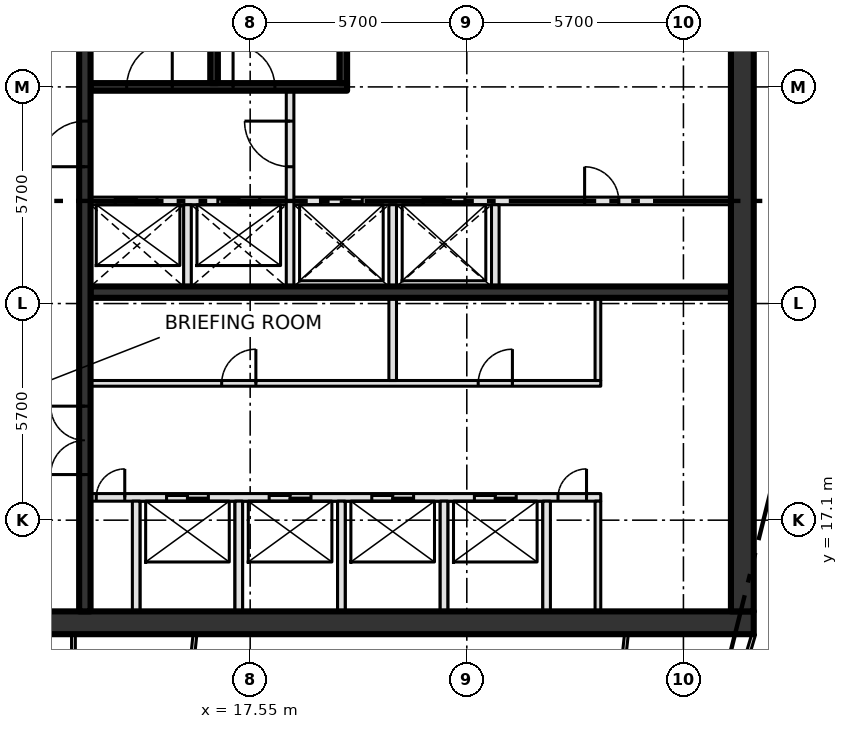
"""IFC4 building model, lengths in metres.
Left out: names, types, materials, properties, quantities, classifications, styles, units other than length and angle.
Written with IfcOpenShell. Run it as: python <this file> out.ifc"""

import sys

from ifc_helpers import new_model, si_unit, direction, frame, frame_2d, origin, place, context, subcontext, project, spatial, rectangle, extrude, element, fill, save


model = new_model("IFC4")
c1 = context("Model", 3, precision=1e-05, world=origin(), true_north=direction((0.0, 1.0)))
c2 = subcontext(c1, "Body", "Model", "MODEL_VIEW")
j1 = project(units=[si_unit("LENGTHUNIT", "METRE"), si_unit("PLANEANGLEUNIT", "RADIAN")], contexts=[c1])
p1 = place(None, origin())
s1 = spatial("IfcSite", under=j1, at=p1, CompositionType="ELEMENT")
p2 = place(p1, origin())
s2 = spatial("IfcBuilding", under=s1, at=p2, CompositionType="ELEMENT")
p3 = place(p2, frame((0.0, 0.0, 323.4)))
s3 = spatial("IfcBuildingStorey", under=s2, at=p3, CompositionType="ELEMENT", Elevation=323.4)
p4 = place(p3, frame((8.0, 14.4, -0.3), z_axis=(0.0, 0.0, 1.0), x_axis=(1.0, 0.0, 0.0)))
e1 = element("IfcWall", 1, at=p4, inside=s3, PredefinedType="SHEAR", context=c2, shape_type="SweptSolid", body=[
    extrude(rectangle(XDim=22.8, YDim=0.6, at=frame_2d((11.4, 0.0))), origin(), (0.0, 0.0, 1.0), 4.2),
])
p5 = place(p4, frame((2.3, 0.0, 0.3)))
e2 = element("IfcOpeningElement", 2, at=p5, cuts=e1, PredefinedType="OPENING", context=c2, shape_type="SweptSolid", body=[
    extrude(rectangle(XDim=1.8, YDim=2.1, at=frame_2d((0.9, 1.05))), frame((0.0, 0.31, 0.0), z_axis=(0.0, -1.0, 0.0), x_axis=(1.0, 0.0, 0.0)), (0.0, 0.0, 1.0), 0.62),
])
p6 = place(p3, frame((30.5, 14.7, -0.3), z_axis=(0.0, 0.0, 1.0), x_axis=(0.0, 1.0, 0.0)))
e3 = element("IfcWall", 3, at=p6, inside=s3, PredefinedType="SHEAR", context=c2, shape_type="SweptSolid", body=[
    extrude(rectangle(XDim=21.0, YDim=0.6, at=frame_2d((10.5, 0.0))), origin(), (0.0, 0.0, 1.0), 4.2),
])
p7 = place(p3, frame((13.35, 17.7, 0.0), z_axis=(0.0, 0.0, 1.0), x_axis=(1.0, 0.0, 0.0)))
e4 = element("IfcWall", 4, at=p7, inside=s3, PredefinedType="SOLIDWALL", context=c2, shape_type="SweptSolid", body=[
    extrude(rectangle(XDim=13.425, YDim=0.2, at=frame_2d((6.712, 0.0))), origin(), (0.0, 0.0, 1.0), 3.9),
])
p8 = place(p7, frame((2.0, 0.0, 0.0)))
e5 = element("IfcOpeningElement", 5, at=p8, cuts=e4, PredefinedType="OPENING", context=c2, shape_type="SweptSolid", body=[
    extrude(rectangle(XDim=1.1, YDim=2.1, at=frame_2d((0.55, 1.05))), frame((0.0, 0.11, 0.0), z_axis=(0.0, -1.0, 0.0), x_axis=(1.0, 0.0, 0.0)), (0.0, 0.0, 1.0), 0.22),
])
p9 = place(p7, frame((4.7, 0.0, 0.0)))
e6 = element("IfcOpeningElement", 6, at=p9, cuts=e4, PredefinedType="OPENING", context=c2, shape_type="SweptSolid", body=[
    extrude(rectangle(XDim=1.1, YDim=2.1, at=frame_2d((0.55, 1.05))), frame((0.0, 0.11, 0.0), z_axis=(0.0, -1.0, 0.0), x_axis=(1.0, 0.0, 0.0)), (0.0, 0.0, 1.0), 0.22),
])
p10 = place(p7, frame((7.4, 0.0, 0.0)))
e7 = element("IfcOpeningElement", 7, at=p10, cuts=e4, PredefinedType="OPENING", context=c2, shape_type="SweptSolid", body=[
    extrude(rectangle(XDim=1.1, YDim=2.1, at=frame_2d((0.55, 1.05))), frame((0.0, 0.11, 0.0), z_axis=(0.0, -1.0, 0.0), x_axis=(1.0, 0.0, 0.0)), (0.0, 0.0, 1.0), 0.22),
])
p11 = place(p7, frame((10.1, 0.0, 0.0)))
e8 = element("IfcOpeningElement", 8, at=p11, cuts=e4, PredefinedType="OPENING", context=c2, shape_type="SweptSolid", body=[
    extrude(rectangle(XDim=1.1, YDim=2.1, at=frame_2d((0.55, 1.05))), frame((0.0, 0.11, 0.0), z_axis=(0.0, -1.0, 0.0), x_axis=(1.0, 0.0, 0.0)), (0.0, 0.0, 1.0), 0.22),
])
p12 = place(p7, frame((0.15, 0.0, 0.0)))
e9 = element("IfcOpeningElement", 9, at=p12, cuts=e4, PredefinedType="OPENING", context=c2, shape_type="SweptSolid", body=[
    extrude(rectangle(XDim=0.75, YDim=2.1, at=frame_2d((0.375, 1.05))), frame((0.0, 0.11, 0.0), z_axis=(0.0, -1.0, 0.0), x_axis=(1.0, 0.0, 0.0)), (0.0, 0.0, 1.0), 0.22),
])
p13 = place(p7, frame((12.3, 0.0, 0.0)))
e10 = element("IfcOpeningElement", 10, at=p13, cuts=e4, PredefinedType="OPENING", context=c2, shape_type="SweptSolid", body=[
    extrude(rectangle(XDim=0.75, YDim=2.1, at=frame_2d((0.375, 1.05))), frame((0.0, 0.11, 0.0), z_axis=(0.0, -1.0, 0.0), x_axis=(1.0, 0.0, 0.0)), (0.0, 0.0, 1.0), 0.22),
])
p14 = place(p3, frame((13.35, 20.7, 0.0), z_axis=(0.0, 0.0, 1.0), x_axis=(1.0, 0.0, 0.0)))
e11 = element("IfcWall", 11, at=p14, inside=s3, PredefinedType="PARTITIONING", context=c2, shape_type="SweptSolid", body=[
    extrude(rectangle(XDim=13.425, YDim=0.15, at=frame_2d((6.712, 0.0))), origin(), (0.0, 0.0, 1.0), 3.9),
])
p15 = place(p14, frame((3.45, 0.0, 0.0)))
e12 = element("IfcOpeningElement", 12, at=p15, cuts=e11, PredefinedType="OPENING", context=c2, shape_type="SweptSolid", body=[
    extrude(rectangle(XDim=0.9, YDim=2.1, at=frame_2d((0.45, 1.05))), frame((0.0, 0.085, 0.0), z_axis=(0.0, -1.0, 0.0), x_axis=(1.0, 0.0, 0.0)), (0.0, 0.0, 1.0), 0.17),
])
p16 = place(p14, frame((10.2, 0.0, 0.0)))
e13 = element("IfcOpeningElement", 13, at=p16, cuts=e11, PredefinedType="OPENING", context=c2, shape_type="SweptSolid", body=[
    extrude(rectangle(XDim=0.9, YDim=2.1, at=frame_2d((0.45, 1.05))), frame((0.0, 0.085, 0.0), z_axis=(0.0, -1.0, 0.0), x_axis=(1.0, 0.0, 0.0)), (0.0, 0.0, 1.0), 0.17),
])
p17 = place(p3, frame((13.35, 23.1, 0.0), z_axis=(0.0, 0.0, 1.0), x_axis=(1.0, 0.0, 0.0)))
e14 = element("IfcWall", 14, at=p17, inside=s3, PredefinedType="SHEAR", context=c2, shape_type="SweptSolid", body=[
    extrude(rectangle(XDim=16.85, YDim=0.3, at=frame_2d((8.425, 0.0))), origin(), (0.0, 0.0, 1.0), 3.9),
])
p18 = place(p3, frame((13.35, 25.5, 0.0), z_axis=(0.0, 0.0, 1.0), x_axis=(1.0, 0.0, 0.0)))
e15 = element("IfcWall", 15, at=p18, inside=s3, PredefinedType="SOLIDWALL", context=c2, shape_type="SweptSolid", body=[
    extrude(rectangle(XDim=16.85, YDim=0.2, at=frame_2d((8.425, 0.0))), origin(), (0.0, 0.0, 1.0), 3.9),
])
p19 = place(p18, frame((0.65, 0.0, 0.0)))
e16 = element("IfcOpeningElement", 16, at=p19, cuts=e15, PredefinedType="OPENING", context=c2, shape_type="SweptSolid", body=[
    extrude(rectangle(XDim=1.1, YDim=2.1, at=frame_2d((0.55, 1.05))), frame((0.0, 0.11, 0.0), z_axis=(0.0, -1.0, 0.0), x_axis=(1.0, 0.0, 0.0)), (0.0, 0.0, 1.0), 0.22),
])
p20 = place(p18, frame((3.35, 0.0, 0.0)))
e17 = element("IfcOpeningElement", 17, at=p20, cuts=e15, PredefinedType="OPENING", context=c2, shape_type="SweptSolid", body=[
    extrude(rectangle(XDim=1.1, YDim=2.1, at=frame_2d((0.55, 1.05))), frame((0.0, 0.11, 0.0), z_axis=(0.0, -1.0, 0.0), x_axis=(1.0, 0.0, 0.0)), (0.0, 0.0, 1.0), 0.22),
])
p21 = place(p18, frame((6.05, 0.0, 0.0)))
e18 = element("IfcOpeningElement", 18, at=p21, cuts=e15, PredefinedType="OPENING", context=c2, shape_type="SweptSolid", body=[
    extrude(rectangle(XDim=1.1, YDim=2.1, at=frame_2d((0.55, 1.05))), frame((0.0, 0.11, 0.0), z_axis=(0.0, -1.0, 0.0), x_axis=(1.0, 0.0, 0.0)), (0.0, 0.0, 1.0), 0.22),
])
p22 = place(p18, frame((8.75, 0.0, 0.0)))
e19 = element("IfcOpeningElement", 19, at=p22, cuts=e15, PredefinedType="OPENING", context=c2, shape_type="SweptSolid", body=[
    extrude(rectangle(XDim=1.1, YDim=2.1, at=frame_2d((0.55, 1.05))), frame((0.0, 0.11, 0.0), z_axis=(0.0, -1.0, 0.0), x_axis=(1.0, 0.0, 0.0)), (0.0, 0.0, 1.0), 0.22),
])
p23 = place(p18, frame((13.0, 0.0, 0.0)))
e20 = element("IfcOpeningElement", 20, at=p23, cuts=e15, PredefinedType="OPENING", context=c2, shape_type="SweptSolid", body=[
    extrude(rectangle(XDim=0.9, YDim=2.1, at=frame_2d((0.45, 1.05))), frame((0.0, 0.11, 0.0), z_axis=(0.0, -1.0, 0.0), x_axis=(1.0, 0.0, 0.0)), (0.0, 0.0, 1.0), 0.22),
])
p24 = place(p3, frame((13.35, 28.5, 0.0), z_axis=(0.0, 0.0, 1.0), x_axis=(1.0, 0.0, 0.0)))
e21 = element("IfcWall", 21, at=p24, inside=s3, PredefinedType="SOLIDWALL", context=c2, shape_type="SweptSolid", body=[
    extrude(rectangle(XDim=6.75, YDim=0.2, at=frame_2d((3.375, 0.0))), origin(), (0.0, 0.0, 1.0), 3.9),
])
p25 = place(p24, frame((0.95, 0.0, 0.0)))
e22 = element("IfcOpeningElement", 22, at=p25, cuts=e21, PredefinedType="OPENING", context=c2, shape_type="SweptSolid", body=[
    extrude(rectangle(XDim=1.2, YDim=2.1, at=frame_2d((0.6, 1.05))), frame((0.0, 0.11, 0.0), z_axis=(0.0, -1.0, 0.0), x_axis=(1.0, 0.0, 0.0)), (0.0, 0.0, 1.0), 0.22),
])
p26 = place(p24, frame((3.75, 0.0, 0.0)))
e23 = element("IfcOpeningElement", 23, at=p26, cuts=e21, PredefinedType="OPENING", context=c2, shape_type="SweptSolid", body=[
    extrude(rectangle(XDim=1.1, YDim=2.1, at=frame_2d((0.55, 1.05))), frame((0.0, 0.11, 0.0), z_axis=(0.0, -1.0, 0.0), x_axis=(1.0, 0.0, 0.0)), (0.0, 0.0, 1.0), 0.22),
])
p27 = place(p3, frame((13.2, 14.7, 0.0), z_axis=(0.0, 0.0, 1.0), x_axis=(0.0, 1.0, 0.0)))
e24 = element("IfcWall", 24, at=p27, inside=s3, PredefinedType="SHEAR", context=c2, shape_type="SweptSolid", body=[
    extrude(rectangle(XDim=21.0, YDim=0.3, at=frame_2d((10.5, 0.0))), origin(), (0.0, 0.0, 1.0), 3.9),
])
p28 = place(p27, frame((3.6, 0.0, 0.0)))
e25 = element("IfcOpeningElement", 25, at=p28, cuts=e24, PredefinedType="OPENING", context=c2, shape_type="SweptSolid", body=[
    extrude(rectangle(XDim=1.8, YDim=2.1, at=frame_2d((0.9, 1.05))), frame((0.0, 0.16, 0.0), z_axis=(0.0, -1.0, 0.0), x_axis=(1.0, 0.0, 0.0)), (0.0, 0.0, 1.0), 0.32),
])
p29 = place(p27, frame((11.7, 0.0, 0.0)))
e26 = element("IfcOpeningElement", 26, at=p29, cuts=e24, PredefinedType="OPENING", context=c2, shape_type="SweptSolid", body=[
    extrude(rectangle(XDim=1.2, YDim=2.1, at=frame_2d((0.6, 1.05))), frame((0.0, 0.16, 0.0), z_axis=(0.0, -1.0, 0.0), x_axis=(1.0, 0.0, 0.0)), (0.0, 0.0, 1.0), 0.32),
])
p30 = place(p3, frame((14.55, 14.7, 0.0), z_axis=(0.0, 0.0, 1.0), x_axis=(0.0, 1.0, 0.0)))
e27 = element("IfcWall", 27, at=p30, inside=s3, PredefinedType="SOLIDWALL", context=c2, shape_type="SweptSolid", body=[
    extrude(rectangle(XDim=2.9, YDim=0.2, at=frame_2d((1.45, 0.0))), origin(), (0.0, 0.0, 1.0), 3.9),
])
p31 = place(p3, frame((15.9, 23.25, 0.0), z_axis=(0.0, 0.0, 1.0), x_axis=(0.0, 1.0, 0.0)))
e28 = element("IfcWall", 28, at=p31, inside=s3, PredefinedType="SOLIDWALL", context=c2, shape_type="SweptSolid", body=[
    extrude(rectangle(XDim=2.15, YDim=0.2, at=frame_2d((1.075, 0.0))), origin(), (0.0, 0.0, 1.0), 3.9),
])
p32 = place(p3, frame((16.6, 28.6, 0.0), z_axis=(0.0, 0.0, 1.0), x_axis=(0.0, 1.0, 0.0)))
e29 = element("IfcWall", 29, at=p32, inside=s3, PredefinedType="SOLIDWALL", context=c2, shape_type="SweptSolid", body=[
    extrude(rectangle(XDim=7.1, YDim=0.2, at=frame_2d((3.55, 0.0))), origin(), (0.0, 0.0, 1.0), 3.9),
])
p33 = place(p3, frame((17.25, 14.7, 0.0), z_axis=(0.0, 0.0, 1.0), x_axis=(0.0, 1.0, 0.0)))
e30 = element("IfcWall", 30, at=p33, inside=s3, PredefinedType="SOLIDWALL", context=c2, shape_type="SweptSolid", body=[
    extrude(rectangle(XDim=2.9, YDim=0.2, at=frame_2d((1.45, 0.0))), origin(), (0.0, 0.0, 1.0), 3.9),
])
p34 = place(p3, frame((18.6, 23.25, 0.0), z_axis=(0.0, 0.0, 1.0), x_axis=(0.0, 1.0, 0.0)))
e31 = element("IfcWall", 31, at=p34, inside=s3, PredefinedType="SOLIDWALL", context=c2, shape_type="SweptSolid", body=[
    extrude(rectangle(XDim=5.15, YDim=0.2, at=frame_2d((2.575, 0.0))), origin(), (0.0, 0.0, 1.0), 3.9),
])
p35 = place(p34, frame((3.15, 0.0, 0.0)))
e32 = element("IfcOpeningElement", 32, at=p35, cuts=e31, PredefinedType="OPENING", context=c2, shape_type="SweptSolid", body=[
    extrude(rectangle(XDim=1.2, YDim=2.1, at=frame_2d((0.6, 1.05))), frame((0.0, 0.11, 0.0), z_axis=(0.0, -1.0, 0.0), x_axis=(1.0, 0.0, 0.0)), (0.0, 0.0, 1.0), 0.22),
])
p36 = place(p3, frame((19.95, 14.7, 0.0), z_axis=(0.0, 0.0, 1.0), x_axis=(0.0, 1.0, 0.0)))
e33 = element("IfcWall", 33, at=p36, inside=s3, PredefinedType="SOLIDWALL", context=c2, shape_type="SweptSolid", body=[
    extrude(rectangle(XDim=2.9, YDim=0.2, at=frame_2d((1.45, 0.0))), origin(), (0.0, 0.0, 1.0), 3.9),
])
p37 = place(p3, frame((20.0, 28.6, 0.0), z_axis=(0.0, 0.0, 1.0), x_axis=(0.0, 1.0, 0.0)))
e34 = element("IfcWall", 34, at=p37, inside=s3, PredefinedType="SOLIDWALL", context=c2, shape_type="SweptSolid", body=[
    extrude(rectangle(XDim=7.1, YDim=0.2, at=frame_2d((3.55, 0.0))), origin(), (0.0, 0.0, 1.0), 3.9),
])
p38 = place(p3, frame((21.3, 20.775, 0.0), z_axis=(0.0, 0.0, 1.0), x_axis=(0.0, 1.0, 0.0)))
e35 = element("IfcWall", 35, at=p38, inside=s3, PredefinedType="SOLIDWALL", context=c2, shape_type="SweptSolid", body=[
    extrude(rectangle(XDim=4.625, YDim=0.2, at=frame_2d((2.312, 0.0))), origin(), (0.0, 0.0, 1.0), 3.9),
])
p39 = place(p3, frame((22.65, 14.7, 0.0), z_axis=(0.0, 0.0, 1.0), x_axis=(0.0, 1.0, 0.0)))
e36 = element("IfcWall", 36, at=p39, inside=s3, PredefinedType="SOLIDWALL", context=c2, shape_type="SweptSolid", body=[
    extrude(rectangle(XDim=2.9, YDim=0.2, at=frame_2d((1.45, 0.0))), origin(), (0.0, 0.0, 1.0), 3.9),
])
p40 = place(p3, frame((24.0, 23.25, 0.0), z_axis=(0.0, 0.0, 1.0), x_axis=(0.0, 1.0, 0.0)))
e37 = element("IfcWall", 37, at=p40, inside=s3, PredefinedType="SOLIDWALL", context=c2, shape_type="SweptSolid", body=[
    extrude(rectangle(XDim=2.15, YDim=0.2, at=frame_2d((1.075, 0.0))), origin(), (0.0, 0.0, 1.0), 3.9),
])
p41 = place(p3, frame((25.35, 14.7, 0.0), z_axis=(0.0, 0.0, 1.0), x_axis=(0.0, 1.0, 0.0)))
e38 = element("IfcWall", 38, at=p41, inside=s3, PredefinedType="SOLIDWALL", context=c2, shape_type="SweptSolid", body=[
    extrude(rectangle(XDim=2.9, YDim=0.2, at=frame_2d((1.45, 0.0))), origin(), (0.0, 0.0, 1.0), 3.9),
])
p42 = place(p3, frame((26.7, 14.7, 0.0), z_axis=(0.0, 0.0, 1.0), x_axis=(0.0, 1.0, 0.0)))
e39 = element("IfcWall", 39, at=p42, inside=s3, PredefinedType="PARTITIONING", context=c2, shape_type="SweptSolid", body=[
    extrude(rectangle(XDim=2.9, YDim=0.15, at=frame_2d((1.45, 0.0))), origin(), (0.0, 0.0, 1.0), 3.9),
])
p43 = place(p3, frame((26.7, 20.775, 0.0), z_axis=(0.0, 0.0, 1.0), x_axis=(0.0, 1.0, 0.0)))
e40 = element("IfcWall", 40, at=p43, inside=s3, PredefinedType="PARTITIONING", context=c2, shape_type="SweptSolid", body=[
    extrude(rectangle(XDim=2.175, YDim=0.15, at=frame_2d((1.087, 0.0))), origin(), (0.0, 0.0, 1.0), 3.9),
])
p44 = place(p3, frame((12.9, 10.078, 0.0), z_axis=(0.0, 0.0, 1.0), x_axis=(0.0, 1.0, 0.0)))
e41 = element("IfcWall", 41, at=p44, inside=s3, PredefinedType="PARTITIONING", context=c2, shape_type="SweptSolid", body=[
    extrude(rectangle(XDim=4.022, YDim=0.1, at=frame_2d((2.011, 0.0))), origin(), (0.0, 0.0, 1.0), 3.9),
])
p45 = place(p3, frame((30.8, 14.1, 0.0), z_axis=(0.0, 0.0, 1.0), x_axis=(-0.28588265334, -0.958264633867, 0.0)))
e42 = element("IfcWall", 42, at=p45, inside=s3, PredefinedType="PARTITIONING", context=c2, shape_type="SweptSolid", body=[
    extrude(rectangle(XDim=8.776, YDim=0.1, at=frame_2d((4.388, 0.0))), origin(), (0.0, 0.0, 1.0), 3.9),
])
p46 = place(p45, frame((3.68, 0.0, 0.0)))
e43 = element("IfcOpeningElement", 43, at=p46, cuts=e42, PredefinedType="OPENING", context=c2, shape_type="SweptSolid", body=[
    extrude(rectangle(XDim=1.0, YDim=2.1, at=frame_2d((0.5, 1.05))), frame((0.0, 0.06, 0.0), z_axis=(0.0, -1.0, 0.0), x_axis=(1.0, 0.0, 0.0)), (0.0, 0.0, 1.0), 0.12),
])
p47 = place(p3, frame((15.554, 8.924, 0.0), z_axis=(0.0, 0.0, 1.0), x_axis=(0.104513853303, 0.994523430829, 0.0)))
e44 = element("IfcWall", 44, at=p47, inside=s3, PredefinedType="PARTITIONING", context=c2, shape_type="SweptSolid", body=[
    extrude(rectangle(XDim=5.205, YDim=0.1, at=frame_2d((2.602, 0.0))), origin(), (0.0, 0.0, 1.0), 3.9),
])
p48 = place(p3, frame((26.615, 6.166, 0.0), z_axis=(0.0, 0.0, 1.0), x_axis=(0.10453822663, 0.994520869149, 0.0)))
e45 = element("IfcWall", 45, at=p48, inside=s3, PredefinedType="PARTITIONING", context=c2, shape_type="SweptSolid", body=[
    extrude(rectangle(XDim=7.978, YDim=0.1, at=frame_2d((3.989, 0.0))), origin(), (0.0, 0.0, 1.0), 3.9),
])
p49 = place(p8, origin())
e46 = element("IfcDoor", 46, at=p49, inside=s3, OperationType="SLIDING_TO_LEFT", PredefinedType="DOOR", context=c2, shape_type="SweptSolid", body=[
    extrude(rectangle(XDim=1.1, YDim=2.1, at=frame_2d((0.55, 1.05))), frame((0.0, 0.025, 0.0), z_axis=(0.0, -1.0, 0.0), x_axis=(1.0, 0.0, 0.0)), (0.0, 0.0, 1.0), 0.05),
])
fill(e5, e46)
p50 = place(p9, origin())
e47 = element("IfcDoor", 47, at=p50, inside=s3, OperationType="SLIDING_TO_LEFT", PredefinedType="DOOR", context=c2, shape_type="SweptSolid", body=[
    extrude(rectangle(XDim=1.1, YDim=2.1, at=frame_2d((0.55, 1.05))), frame((0.0, 0.025, 0.0), z_axis=(0.0, -1.0, 0.0), x_axis=(1.0, 0.0, 0.0)), (0.0, 0.0, 1.0), 0.05),
])
fill(e6, e47)
p51 = place(p10, origin())
e48 = element("IfcDoor", 48, at=p51, inside=s3, OperationType="SLIDING_TO_LEFT", PredefinedType="DOOR", context=c2, shape_type="SweptSolid", body=[
    extrude(rectangle(XDim=1.1, YDim=2.1, at=frame_2d((0.55, 1.05))), frame((0.0, 0.025, 0.0), z_axis=(0.0, -1.0, 0.0), x_axis=(1.0, 0.0, 0.0)), (0.0, 0.0, 1.0), 0.05),
])
fill(e7, e48)
p52 = place(p11, origin())
e49 = element("IfcDoor", 49, at=p52, inside=s3, OperationType="SLIDING_TO_LEFT", PredefinedType="DOOR", context=c2, shape_type="SweptSolid", body=[
    extrude(rectangle(XDim=1.1, YDim=2.1, at=frame_2d((0.55, 1.05))), frame((0.0, 0.025, 0.0), z_axis=(0.0, -1.0, 0.0), x_axis=(1.0, 0.0, 0.0)), (0.0, 0.0, 1.0), 0.05),
])
fill(e8, e49)
p53 = place(p19, origin())
e50 = element("IfcDoor", 50, at=p53, inside=s3, OperationType="SLIDING_TO_LEFT", PredefinedType="DOOR", context=c2, shape_type="SweptSolid", body=[
    extrude(rectangle(XDim=1.1, YDim=2.1, at=frame_2d((0.55, 1.05))), frame((0.0, 0.025, 0.0), z_axis=(0.0, -1.0, 0.0), x_axis=(1.0, 0.0, 0.0)), (0.0, 0.0, 1.0), 0.05),
])
fill(e16, e50)
p54 = place(p20, origin())
e51 = element("IfcDoor", 51, at=p54, inside=s3, OperationType="SLIDING_TO_LEFT", PredefinedType="DOOR", context=c2, shape_type="SweptSolid", body=[
    extrude(rectangle(XDim=1.1, YDim=2.1, at=frame_2d((0.55, 1.05))), frame((0.0, 0.025, 0.0), z_axis=(0.0, -1.0, 0.0), x_axis=(1.0, 0.0, 0.0)), (0.0, 0.0, 1.0), 0.05),
])
fill(e17, e51)
p55 = place(p21, origin())
e52 = element("IfcDoor", 52, at=p55, inside=s3, OperationType="SLIDING_TO_LEFT", PredefinedType="DOOR", context=c2, shape_type="SweptSolid", body=[
    extrude(rectangle(XDim=1.1, YDim=2.1, at=frame_2d((0.55, 1.05))), frame((0.0, 0.025, 0.0), z_axis=(0.0, -1.0, 0.0), x_axis=(1.0, 0.0, 0.0)), (0.0, 0.0, 1.0), 0.05),
])
fill(e18, e52)
p56 = place(p22, origin())
e53 = element("IfcDoor", 53, at=p56, inside=s3, OperationType="SLIDING_TO_LEFT", PredefinedType="DOOR", context=c2, shape_type="SweptSolid", body=[
    extrude(rectangle(XDim=1.1, YDim=2.1, at=frame_2d((0.55, 1.05))), frame((0.0, 0.025, 0.0), z_axis=(0.0, -1.0, 0.0), x_axis=(1.0, 0.0, 0.0)), (0.0, 0.0, 1.0), 0.05),
])
fill(e19, e53)
p57 = place(p12, origin())
e54 = element("IfcDoor", 54, at=p57, inside=s3, OperationType="SINGLE_SWING_RIGHT", PredefinedType="DOOR", context=c2, shape_type="SweptSolid", body=[
    extrude(rectangle(XDim=0.75, YDim=2.1, at=frame_2d((0.375, 1.05))), frame((0.0, 0.025, 0.0), z_axis=(0.0, -1.0, 0.0), x_axis=(1.0, 0.0, 0.0)), (0.0, 0.0, 1.0), 0.05),
])
fill(e9, e54)
p58 = place(p13, origin())
e55 = element("IfcDoor", 55, at=p58, inside=s3, OperationType="SINGLE_SWING_RIGHT", PredefinedType="DOOR", context=c2, shape_type="SweptSolid", body=[
    extrude(rectangle(XDim=0.75, YDim=2.1, at=frame_2d((0.375, 1.05))), frame((0.0, 0.025, 0.0), z_axis=(0.0, -1.0, 0.0), x_axis=(1.0, 0.0, 0.0)), (0.0, 0.0, 1.0), 0.05),
])
fill(e10, e55)
p59 = place(p15, origin())
e56 = element("IfcDoor", 56, at=p59, inside=s3, OperationType="SINGLE_SWING_RIGHT", PredefinedType="DOOR", context=c2, shape_type="SweptSolid", body=[
    extrude(rectangle(XDim=0.9, YDim=2.1, at=frame_2d((0.45, 1.05))), frame((0.0, 0.025, 0.0), z_axis=(0.0, -1.0, 0.0), x_axis=(1.0, 0.0, 0.0)), (0.0, 0.0, 1.0), 0.05),
])
fill(e12, e56)
p60 = place(p16, origin())
e57 = element("IfcDoor", 57, at=p60, inside=s3, OperationType="SINGLE_SWING_RIGHT", PredefinedType="DOOR", context=c2, shape_type="SweptSolid", body=[
    extrude(rectangle(XDim=0.9, YDim=2.1, at=frame_2d((0.45, 1.05))), frame((0.0, 0.025, 0.0), z_axis=(0.0, -1.0, 0.0), x_axis=(1.0, 0.0, 0.0)), (0.0, 0.0, 1.0), 0.05),
])
fill(e13, e57)
p61 = place(p23, origin())
e58 = element("IfcDoor", 58, at=p61, inside=s3, OperationType="SINGLE_SWING_LEFT", PredefinedType="DOOR", context=c2, shape_type="SweptSolid", body=[
    extrude(rectangle(XDim=0.9, YDim=2.1, at=frame_2d((0.45, 1.05))), frame((0.0, 0.025, 0.0), z_axis=(0.0, -1.0, 0.0), x_axis=(1.0, 0.0, 0.0)), (0.0, 0.0, 1.0), 0.05),
])
fill(e20, e58)
p62 = place(p25, origin())
e59 = element("IfcDoor", 59, at=p62, inside=s3, OperationType="SINGLE_SWING_RIGHT", PredefinedType="DOOR", context=c2, shape_type="SweptSolid", body=[
    extrude(rectangle(XDim=1.2, YDim=2.1, at=frame_2d((0.6, 1.05))), frame((0.0, 0.025, 0.0), z_axis=(0.0, -1.0, 0.0), x_axis=(1.0, 0.0, 0.0)), (0.0, 0.0, 1.0), 0.05),
])
fill(e22, e59)
p63 = place(p26, origin())
e60 = element("IfcDoor", 60, at=p63, inside=s3, OperationType="SINGLE_SWING_LEFT", PredefinedType="DOOR", context=c2, shape_type="SweptSolid", body=[
    extrude(rectangle(XDim=1.1, YDim=2.1, at=frame_2d((0.55, 1.05))), frame((0.0, 0.025, 0.0), z_axis=(0.0, -1.0, 0.0), x_axis=(1.0, 0.0, 0.0)), (0.0, 0.0, 1.0), 0.05),
])
fill(e23, e60)
p64 = place(p28, origin())
e61 = element("IfcDoor", 61, at=p64, inside=s3, OperationType="DOUBLE_DOOR_SINGLE_SWING", PredefinedType="DOOR", context=c2, shape_type="SweptSolid", body=[
    extrude(rectangle(XDim=1.8, YDim=2.1, at=frame_2d((0.9, 1.05))), frame((0.0, 0.025, 0.0), z_axis=(0.0, -1.0, 0.0), x_axis=(1.0, 0.0, 0.0)), (0.0, 0.0, 1.0), 0.05),
])
fill(e25, e61)
p65 = place(p29, origin())
e62 = element("IfcDoor", 62, at=p65, inside=s3, OperationType="SINGLE_SWING_LEFT", PredefinedType="DOOR", context=c2, shape_type="SweptSolid", body=[
    extrude(rectangle(XDim=1.2, YDim=2.1, at=frame_2d((0.6, 1.05))), frame((0.0, 0.025, 0.0), z_axis=(0.0, -1.0, 0.0), x_axis=(1.0, 0.0, 0.0)), (0.0, 0.0, 1.0), 0.05),
])
fill(e26, e62)
p66 = place(p35, origin())
e63 = element("IfcDoor", 63, at=p66, inside=s3, OperationType="SINGLE_SWING_RIGHT", PredefinedType="DOOR", context=c2, shape_type="SweptSolid", body=[
    extrude(rectangle(XDim=1.2, YDim=2.1, at=frame_2d((0.6, 1.05))), frame((0.0, 0.025, 0.0), z_axis=(0.0, -1.0, 0.0), x_axis=(1.0, 0.0, 0.0)), (0.0, 0.0, 1.0), 0.05),
])
fill(e32, e63)
save(model, sys.argv[1])
